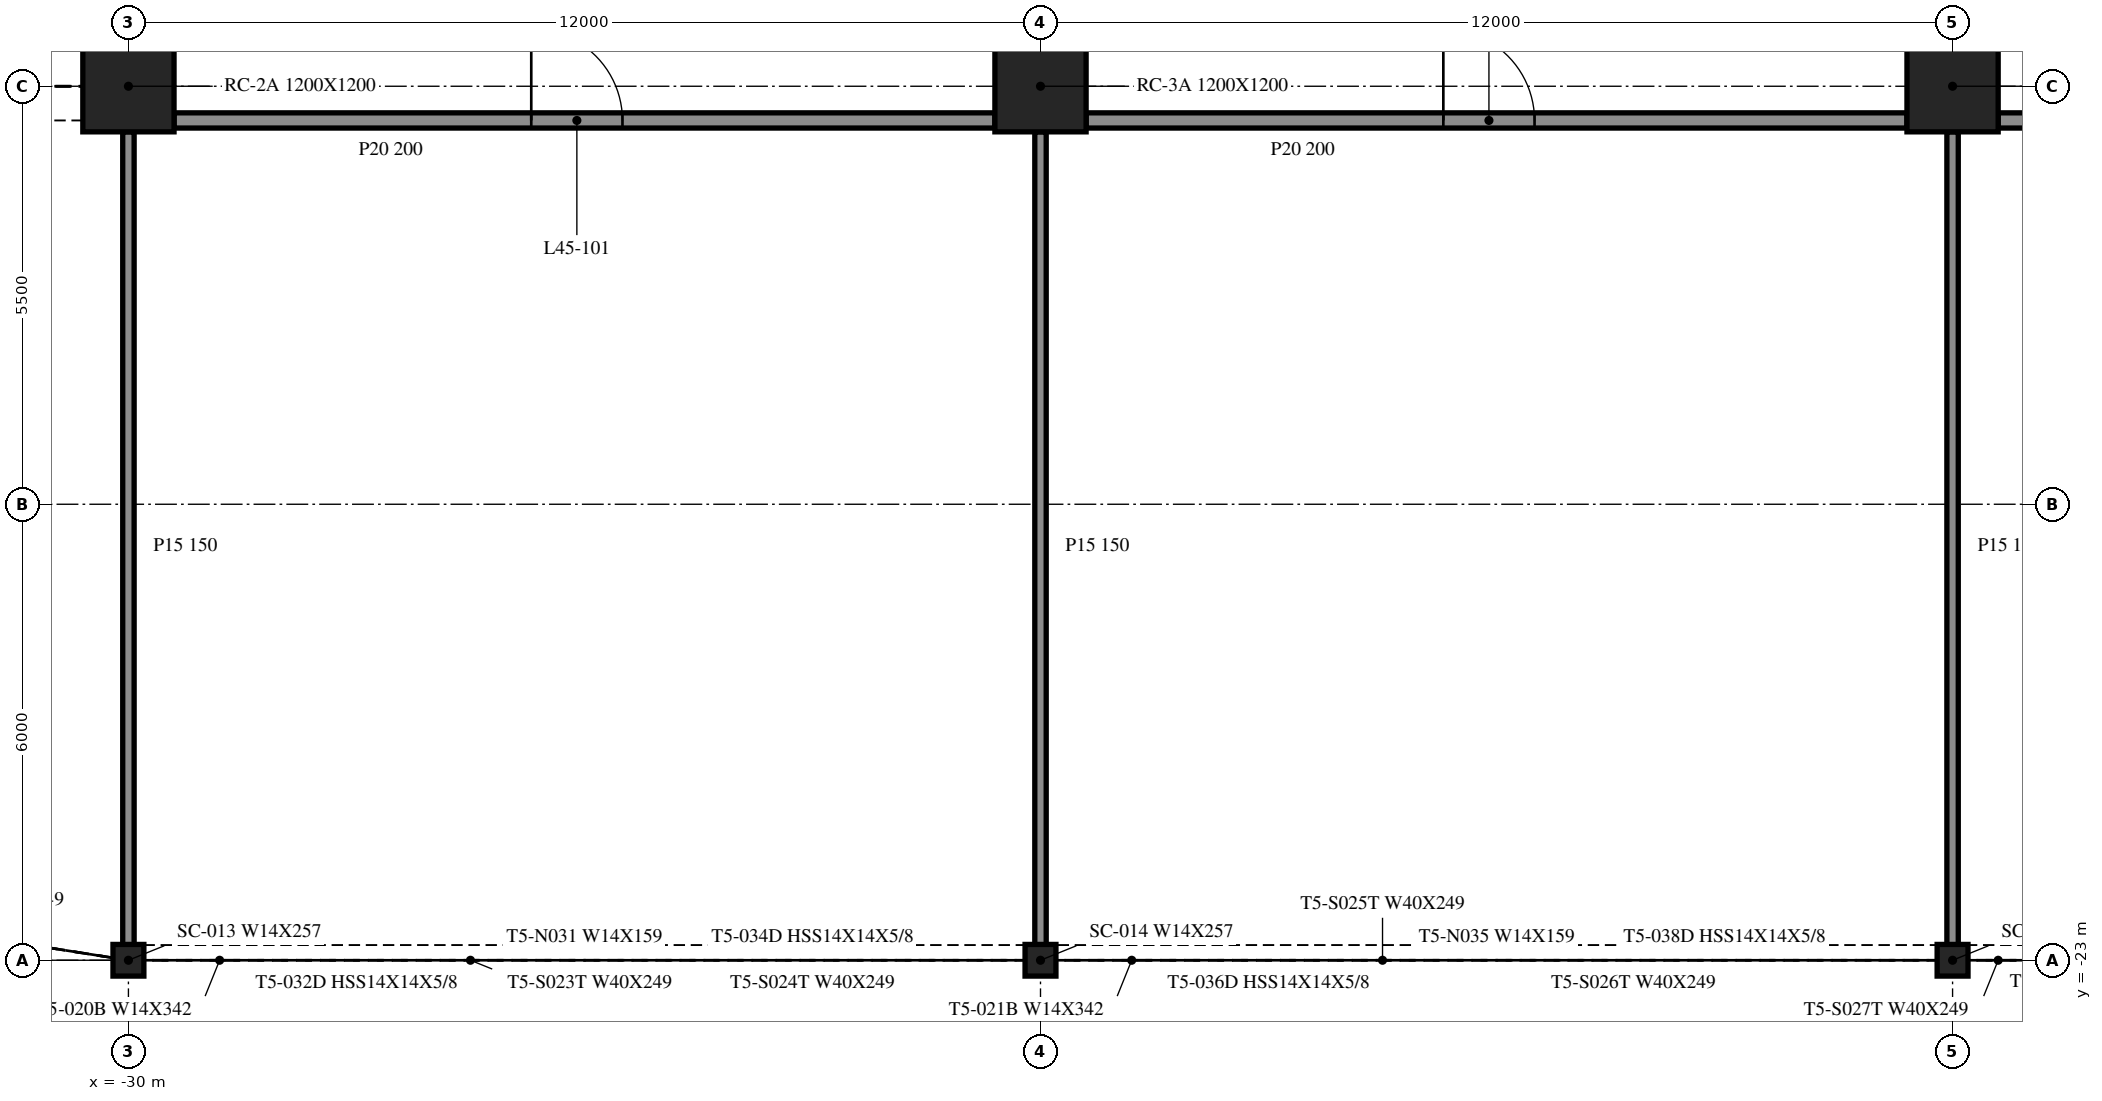
"""IFC4 building model, lengths in metres.
Left out: names, types, materials, properties, quantities, classifications, styles, units other than length and angle.
Written with IfcOpenShell. Run it as: python <this file> out.ifc"""

import sys

from ifc_helpers import new_model, si_unit, direction, frame, frame_2d, origin, origin_2d, place, context, subcontext, project, spatial, rectangle, i_section, extrude, element, fill, save


model = new_model("IFC4")
c1 = context("Model", 3, precision=1e-05, world=origin(), true_north=direction((0.0, 1.0)))
c2 = subcontext(c1, "Body", "Model", "MODEL_VIEW")
j1 = project(units=[si_unit("LENGTHUNIT", "METRE"), si_unit("PLANEANGLEUNIT", "RADIAN")], contexts=[c1])
p1 = place(None, origin())
s1 = spatial("IfcSite", under=j1, at=p1, CompositionType="ELEMENT")
p2 = place(p1, origin())
s2 = spatial("IfcBuilding", under=s1, at=p2, CompositionType="ELEMENT")
p3 = place(p2, frame((0.0, 0.0, 189.6)))
s3 = spatial("IfcBuildingStorey", under=s2, at=p3, CompositionType="ELEMENT", Elevation=189.6)
for number, where, z_axis, x_axis in (
    (1, (-30.0, -11.5, -0.4), (0.0, 0.0, 1.0), (1.0, 0.0, 0.0)),
    (2, (-18.0, -11.5, -0.4), (0.0, 0.0, 1.0), (1.0, 0.0, 0.0)),
    (3, (-6.0, -11.5, -0.4), (0.0, 0.0, 1.0), (1.0, 0.0, 0.0)),
):
    element("IfcColumn", number, at=place(p3, frame(where, z_axis=z_axis, x_axis=x_axis)), inside=s3, PredefinedType="COLUMN", context=c2, shape_type="SweptSolid", body=[
        extrude(rectangle(XDim=1.2, YDim=1.2, at=origin_2d()), origin(), (0.0, 0.0, 1.0), 4.36),
    ])
for number, where, z_axis, x_axis in (
    (4, (-30.0, -23.0, -0.4), (0.0, 0.0, 1.0), (1.0, 0.0, 0.0)),
    (5, (-18.0, -23.0, -0.4), (0.0, 0.0, 1.0), (1.0, 0.0, 0.0)),
    (6, (-6.0, -23.0, -0.4), (0.0, 0.0, 1.0), (1.0, 0.0, 0.0)),
):
    element("IfcColumn", number, at=place(p3, frame(where, z_axis=z_axis, x_axis=x_axis)), inside=s3, PredefinedType="COLUMN", context=c2, shape_type="SweptSolid", body=[
        extrude(i_section(OverallWidth=0.406, OverallDepth=0.417, WebThickness=0.03, FlangeThickness=0.048, at=origin_2d()), origin(), (0.0, 0.0, 1.0), 4.36),
    ])
p4 = place(p3, frame((-29.4, -11.95, 0.0), z_axis=(0.0, 0.0, 1.0), x_axis=(1.0, 0.0, 0.0)))
e7 = element("IfcWall", 7, at=p4, inside=s3, PredefinedType="PARTITIONING", context=c2, shape_type="SweptSolid", body=[
    extrude(rectangle(XDim=10.8, YDim=0.2, at=frame_2d((5.4, 0.0))), origin(), (0.0, 0.0, 1.0), 3.96),
])
p5 = place(p4, frame((4.7, 0.0, 0.0)))
e8 = element("IfcOpeningElement", 8, at=p5, cuts=e7, PredefinedType="OPENING", context=c2, shape_type="SweptSolid", body=[
    extrude(rectangle(XDim=1.2, YDim=2.1, at=frame_2d((0.6, 1.05))), frame((0.0, 0.11, 0.0), z_axis=(0.0, -1.0, 0.0), x_axis=(1.0, 0.0, 0.0)), (0.0, 0.0, 1.0), 0.22),
])
p6 = place(p3, frame((-17.4, -11.95, 0.0), z_axis=(0.0, 0.0, 1.0), x_axis=(1.0, 0.0, 0.0)))
e9 = element("IfcWall", 9, at=p6, inside=s3, PredefinedType="PARTITIONING", context=c2, shape_type="SweptSolid", body=[
    extrude(rectangle(XDim=10.8, YDim=0.2, at=frame_2d((5.4, 0.0))), origin(), (0.0, 0.0, 1.0), 3.96),
])
p7 = place(p6, frame((4.7, 0.0, 0.0)))
e10 = element("IfcOpeningElement", 10, at=p7, cuts=e9, PredefinedType="OPENING", context=c2, shape_type="SweptSolid", body=[
    extrude(rectangle(XDim=1.2, YDim=2.1, at=frame_2d((0.6, 1.05))), frame((0.0, 0.11, 0.0), z_axis=(0.0, -1.0, 0.0), x_axis=(1.0, 0.0, 0.0)), (0.0, 0.0, 1.0), 0.22),
])
p8 = place(p3, frame((-5.4, -11.95, 0.0), z_axis=(0.0, 0.0, 1.0), x_axis=(1.0, 0.0, 0.0)))
e11 = element("IfcWall", 11, at=p8, inside=s3, PredefinedType="PARTITIONING", context=c2, shape_type="SweptSolid", body=[
    extrude(rectangle(XDim=10.8, YDim=0.2, at=frame_2d((5.4, 0.0))), origin(), (0.0, 0.0, 1.0), 3.96),
])
p9 = place(p8, frame((4.9, 0.0, 0.0)))
e12 = element("IfcOpeningElement", 12, at=p9, cuts=e11, PredefinedType="OPENING", context=c2, shape_type="SweptSolid", body=[
    extrude(rectangle(XDim=1.0, YDim=2.1, at=frame_2d((0.5, 1.05))), frame((0.0, 0.11, 0.0), z_axis=(0.0, -1.0, 0.0), x_axis=(1.0, 0.0, 0.0)), (0.0, 0.0, 1.0), 0.22),
])
for number, where, z_axis, x_axis in (
    (13, (-30.0, -23.0, 0.0), (0.0, 0.0, 1.0), (0.0, 1.0, 0.0)),
    (14, (-18.0, -23.0, 0.0), (0.0, 0.0, 1.0), (0.0, 1.0, 0.0)),
    (15, (-6.0, -23.0, 0.0), (0.0, 0.0, 1.0), (0.0, 1.0, 0.0)),
):
    element("IfcWall", number, at=place(p3, frame(where, z_axis=z_axis, x_axis=x_axis)), inside=s3, PredefinedType="PARTITIONING", context=c2, shape_type="SweptSolid", body=[
        extrude(rectangle(XDim=10.9, YDim=0.15, at=frame_2d((5.45, 0.0))), origin(), (0.0, 0.0, 1.0), 3.96),
    ])
p10 = place(p5, origin())
e16 = element("IfcDoor", 16, at=p10, inside=s3, OperationType="SINGLE_SWING_RIGHT", PredefinedType="DOOR", context=c2, shape_type="SweptSolid", body=[
    extrude(rectangle(XDim=1.2, YDim=2.1, at=frame_2d((0.6, 1.05))), frame((0.0, 0.025, 0.0), z_axis=(0.0, -1.0, 0.0), x_axis=(1.0, 0.0, 0.0)), (0.0, 0.0, 1.0), 0.05),
])
fill(e8, e16)
p11 = place(p7, origin())
e17 = element("IfcDoor", 17, at=p11, inside=s3, OperationType="SINGLE_SWING_RIGHT", PredefinedType="DOOR", context=c2, shape_type="SweptSolid", body=[
    extrude(rectangle(XDim=1.2, YDim=2.1, at=frame_2d((0.6, 1.05))), frame((0.0, 0.025, 0.0), z_axis=(0.0, -1.0, 0.0), x_axis=(1.0, 0.0, 0.0)), (0.0, 0.0, 1.0), 0.05),
])
fill(e10, e17)
save(model, sys.argv[1])
